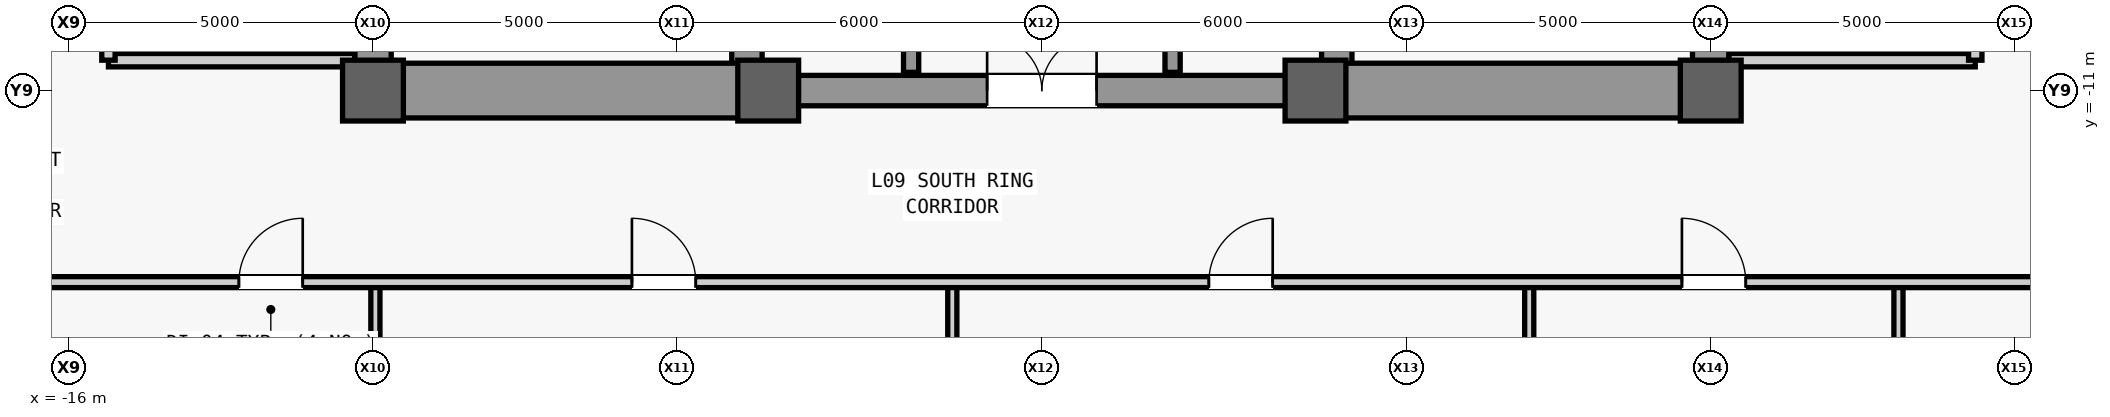
"""IFC4 building model, lengths in metres.
Left out: names, types, materials, properties, quantities, classifications, styles, units other than length and angle.
Written with IfcOpenShell. Run it as: python <this file> out.ifc"""

import sys

from ifc_helpers import new_model, si_unit, direction, frame, frame_2d, origin, origin_2d, place, context, subcontext, project, spatial, rectangle, extrude, source, transform, mapped, element, fill, save


model = new_model("IFC4")
c1 = context("Model", 3, precision=1e-05, world=origin(), true_north=direction((0.0, 1.0)))
c2 = subcontext(c1, "Body", "Model", "MODEL_VIEW")
j1 = project(units=[si_unit("LENGTHUNIT", "METRE"), si_unit("PLANEANGLEUNIT", "RADIAN")], contexts=[c1])
p1 = place(None, origin())
s1 = spatial("IfcSite", under=j1, at=p1, CompositionType="ELEMENT")
p2 = place(p1, origin())
s2 = spatial("IfcBuilding", under=s1, at=p2, CompositionType="ELEMENT")
p3 = place(p2, frame((0.0, 0.0, 45.2)))
s3 = spatial("IfcBuildingStorey", under=s2, at=p3, CompositionType="ELEMENT", Elevation=45.2)
m1 = source(origin(), c2, "Body", "SweptSolid", [
    extrude(rectangle(XDim=22.0, YDim=0.6, at=frame_2d((11.0, 0.0))), origin(), (0.0, 0.0, 1.0), 3.94),
])
p4 = place(p3, frame((-11.0, -11.0, 0.0), z_axis=(0.0, 0.0, 1.0), x_axis=(0.0, 1.0, 0.0)))
e1 = element("IfcWall", 1, at=p4, inside=s3, PredefinedType="SHEAR", context=c2, shape_type="MappedRepresentation", body=[
    mapped(m1, transform((0.0, 0.0, 0.0), scale=1.0)),
])
m2 = source(origin(), c2, "Body", "SweptSolid", [
    extrude(rectangle(XDim=1.1, YDim=2.2, at=frame_2d((0.55, 1.1))), frame((0.0, 0.31, 0.0), z_axis=(0.0, -1.0, 0.0), x_axis=(1.0, 0.0, 0.0)), (0.0, 0.0, 1.0), 0.62),
])
p5 = place(p4, frame((0.8, 0.0, 0.0)))
e2 = element("IfcOpeningElement", 2, at=p5, cuts=e1, PredefinedType="OPENING", context=c2, shape_type="MappedRepresentation", body=[
    mapped(m2, transform((0.0, 0.0, 0.0), scale=1.0)),
])
p6 = place(p4, frame((12.5, 0.0, 0.0)))
e3 = element("IfcOpeningElement", 3, at=p6, cuts=e1, PredefinedType="OPENING", context=c2, shape_type="MappedRepresentation", body=[
    mapped(m2, transform((0.0, 0.0, 0.0), scale=1.0)),
])
m3 = source(origin(), c2, "Body", "SweptSolid", [
    extrude(rectangle(XDim=0.9, YDim=2.15, at=frame_2d((0.45, 1.075))), frame((0.0, 0.31, 0.0), z_axis=(0.0, -1.0, 0.0), x_axis=(1.0, 0.0, 0.0)), (0.0, 0.0, 1.0), 0.62),
])
p7 = place(p4, frame((6.2, 0.0, 0.0)))
e4 = element("IfcOpeningElement", 4, at=p7, cuts=e1, PredefinedType="OPENING", context=c2, shape_type="MappedRepresentation", body=[
    mapped(m3, transform((0.0, 0.0, 0.0), scale=1.0)),
])
p8 = place(p4, frame((8.05, 0.0, 0.0)))
e5 = element("IfcOpeningElement", 5, at=p8, cuts=e1, PredefinedType="OPENING", context=c2, shape_type="MappedRepresentation", body=[
    mapped(m3, transform((0.0, 0.0, 0.0), scale=1.0)),
])
m4 = source(origin(), c2, "Body", "SweptSolid", [
    extrude(rectangle(XDim=1.3, YDim=2.3, at=frame_2d((0.65, 1.15))), frame((0.0, 0.31, 0.0), z_axis=(0.0, -1.0, 0.0), x_axis=(1.0, 0.0, 0.0)), (0.0, 0.0, 1.0), 0.62),
])
p9 = place(p4, frame((2.7, 0.0, 0.0)))
e6 = element("IfcOpeningElement", 6, at=p9, cuts=e1, PredefinedType="OPENING", context=c2, shape_type="MappedRepresentation", body=[
    mapped(m4, transform((0.0, 0.0, 0.0), scale=1.0)),
])
p10 = place(p3, frame((11.0, -11.0, 0.0), z_axis=(0.0, 0.0, 1.0), x_axis=(0.0, 1.0, 0.0)))
e7 = element("IfcWall", 7, at=p10, inside=s3, PredefinedType="SHEAR", context=c2, shape_type="MappedRepresentation", body=[
    mapped(m1, transform((0.0, 0.0, 0.0), scale=1.0)),
])
p11 = place(p10, frame((0.8, 0.0, 0.0)))
e8 = element("IfcOpeningElement", 8, at=p11, cuts=e7, PredefinedType="OPENING", context=c2, shape_type="MappedRepresentation", body=[
    mapped(m2, transform((0.0, 0.0, 0.0), scale=1.0)),
])
p12 = place(p10, frame((6.85, 0.0, 0.0)))
e9 = element("IfcOpeningElement", 9, at=p12, cuts=e7, PredefinedType="OPENING", context=c2, shape_type="MappedRepresentation", body=[
    mapped(m3, transform((0.0, 0.0, 0.0), scale=1.0)),
])
p13 = place(p10, frame((2.7, 0.0, 0.0)))
e10 = element("IfcOpeningElement", 10, at=p13, cuts=e7, PredefinedType="OPENING", context=c2, shape_type="MappedRepresentation", body=[
    mapped(m4, transform((0.0, 0.0, 0.0), scale=1.0)),
])
p14 = place(p10, frame((13.35, 0.0, 0.0)))
e11 = element("IfcOpeningElement", 11, at=p14, cuts=e7, PredefinedType="OPENING", context=c2, shape_type="MappedRepresentation", body=[
    mapped(m4, transform((0.0, 0.0, 0.0), scale=1.0)),
])
m5 = source(origin(), c2, "Body", "SweptSolid", [
    extrude(rectangle(XDim=21.4, YDim=0.5, at=frame_2d((10.7, 0.0))), origin(), (0.0, 0.0, 1.0), 3.94),
])
for number, where, z_axis, x_axis in (
    (12, (-4.85, -10.7, 0.0), (0.0, 0.0, 1.0), (0.0, 1.0, 0.0)),
    (13, (4.85, -10.7, 0.0), (0.0, 0.0, 1.0), (0.0, 1.0, 0.0)),
):
    element("IfcWall", number, at=place(p3, frame(where, z_axis=z_axis, x_axis=x_axis)), inside=s3, PredefinedType="SHEAR", context=c2, shape_type="MappedRepresentation", body=[
        mapped(m5, transform((0.0, 0.0, 0.0), scale=1.0)),
    ])
m6 = source(origin(), c2, "Body", "SweptSolid", [
    extrude(rectangle(XDim=5.85, YDim=0.9, at=frame_2d((2.925, 0.0))), origin(), (0.0, 0.0, 1.0), 3.94),
])
for number, where, z_axis, x_axis in (
    (14, (-10.7, -11.0, 0.0), (0.0, 0.0, 1.0), (1.0, 0.0, 0.0)),
    (15, (4.85, -11.0, 0.0), (0.0, 0.0, 1.0), (1.0, 0.0, 0.0)),
):
    element("IfcWall", number, at=place(p3, frame(where, z_axis=z_axis, x_axis=x_axis)), inside=s3, PredefinedType="SHEAR", context=c2, shape_type="MappedRepresentation", body=[
        mapped(m6, transform((0.0, 0.0, 0.0), scale=1.0)),
    ])
m7 = source(origin(), c2, "Body", "SweptSolid", [
    extrude(rectangle(XDim=9.2, YDim=0.5, at=frame_2d((4.6, 0.0))), origin(), (0.0, 0.0, 1.0), 3.94),
])
p15 = place(p3, frame((-4.6, -11.0, 0.0), z_axis=(0.0, 0.0, 1.0), x_axis=(1.0, 0.0, 0.0)))
e16 = element("IfcWall", 16, at=p15, inside=s3, PredefinedType="SHEAR", context=c2, shape_type="MappedRepresentation", body=[
    mapped(m7, transform((0.0, 0.0, 0.0), scale=1.0)),
])
m8 = source(origin(), c2, "Body", "SweptSolid", [
    extrude(rectangle(XDim=1.8, YDim=2.25, at=frame_2d((0.9, 1.125))), frame((0.0, 0.26, 0.0), z_axis=(0.0, -1.0, 0.0), x_axis=(1.0, 0.0, 0.0)), (0.0, 0.0, 1.0), 0.52),
])
p16 = place(p15, frame((3.7, 0.0, 0.0)))
e17 = element("IfcOpeningElement", 17, at=p16, cuts=e16, PredefinedType="OPENING", context=c2, shape_type="MappedRepresentation", body=[
    mapped(m8, transform((0.0, 0.0, 0.0), scale=1.0)),
])
m9 = source(origin(), c2, "Body", "SweptSolid", [
    extrude(rectangle(XDim=1.0, YDim=1.0, at=origin_2d()), origin(), (0.0, 0.0, 1.0), 4.2),
])
for number, where, z_axis, x_axis in (
    (18, (-11.0, -11.0, 0.0), (0.0, 0.0, 1.0), (1.0, 0.0, 0.0)),
    (19, (-4.5, -11.0, 0.0), (0.0, 0.0, 1.0), (1.0, 0.0, 0.0)),
    (20, (4.5, -11.0, 0.0), (0.0, 0.0, 1.0), (1.0, 0.0, 0.0)),
    (21, (11.0, -11.0, 0.0), (0.0, 0.0, 1.0), (1.0, 0.0, 0.0)),
):
    element("IfcColumn", number, at=place(p3, frame(where, z_axis=z_axis, x_axis=x_axis)), inside=s3, PredefinedType="COLUMN", context=c2, shape_type="MappedRepresentation", body=[
        mapped(m9, transform((0.0, 0.0, 0.0), scale=1.0)),
    ])
m10 = source(origin(), c2, "Body", "SweptSolid", [
    extrude(rectangle(XDim=4.05, YDim=0.22, at=frame_2d((2.025, 0.0))), origin(), (0.0, 0.0, 1.0), 3.94),
])
p17 = place(p3, frame((-15.35, -10.5, 0.0), z_axis=(0.0, 0.0, 1.0), x_axis=(1.0, 0.0, 0.0)))
e22 = element("IfcWall", 22, at=p17, inside=s3, PredefinedType="PARTITIONING", context=c2, shape_type="MappedRepresentation", body=[
    mapped(m10, transform((0.0, 0.0, 0.0), scale=1.0)),
])
m11 = source(origin(), c2, "Body", "SweptSolid", [
    extrude(rectangle(XDim=4.4, YDim=0.22, at=frame_2d((2.2, 0.0))), origin(), (0.0, 0.0, 1.0), 3.94),
])
p18 = place(p3, frame((-15.35, -10.5, 0.0), z_axis=(0.0, 0.0, 1.0), x_axis=(0.0, 1.0, 0.0)))
e23 = element("IfcWall", 23, at=p18, inside=s3, PredefinedType="PARTITIONING", context=c2, shape_type="MappedRepresentation", body=[
    mapped(m11, transform((0.0, 0.0, 0.0), scale=1.0)),
])
m12 = source(origin(), c2, "Body", "SweptSolid", [
    extrude(rectangle(XDim=1.2, YDim=2.2, at=frame_2d((0.6, 1.1))), frame((0.0, 0.12, 0.0), z_axis=(0.0, -1.0, 0.0), x_axis=(1.0, 0.0, 0.0)), (0.0, 0.0, 1.0), 0.24),
])
p19 = place(p18, frame((1.6, 0.0, 0.0)))
e24 = element("IfcOpeningElement", 24, at=p19, cuts=e23, PredefinedType="OPENING", context=c2, shape_type="MappedRepresentation", body=[
    mapped(m12, transform((0.0, 0.0, 0.0), scale=1.0)),
])
p20 = place(p3, frame((11.3, -10.5, 0.0), z_axis=(0.0, 0.0, 1.0), x_axis=(1.0, 0.0, 0.0)))
e25 = element("IfcWall", 25, at=p20, inside=s3, PredefinedType="PARTITIONING", context=c2, shape_type="MappedRepresentation", body=[
    mapped(m10, transform((0.0, 0.0, 0.0), scale=1.0)),
])
p21 = place(p3, frame((15.35, -10.5, 0.0), z_axis=(0.0, 0.0, 1.0), x_axis=(0.0, 1.0, 0.0)))
e26 = element("IfcWall", 26, at=p21, inside=s3, PredefinedType="PARTITIONING", context=c2, shape_type="MappedRepresentation", body=[
    mapped(m11, transform((0.0, 0.0, 0.0), scale=1.0)),
])
p22 = place(p21, frame((1.6, 0.0, 0.0)))
e27 = element("IfcOpeningElement", 27, at=p22, cuts=e26, PredefinedType="OPENING", context=c2, shape_type="MappedRepresentation", body=[
    mapped(m12, transform((0.0, 0.0, 0.0), scale=1.0)),
])
m13 = source(origin(), c2, "Body", "SweptSolid", [
    extrude(rectangle(XDim=5.4, YDim=0.25, at=frame_2d((2.7, 0.0))), origin(), (0.0, 0.0, 1.0), 3.94),
])
p23 = place(p3, frame((-2.15, -10.7, 0.0), z_axis=(0.0, 0.0, 1.0), x_axis=(0.0, 1.0, 0.0)))
e28 = element("IfcWall", 28, at=p23, inside=s3, PredefinedType="SHEAR", context=c2, shape_type="MappedRepresentation", body=[
    mapped(m13, transform((0.0, 0.0, 0.0), scale=1.0)),
])
m14 = source(origin(), c2, "Body", "SweptSolid", [
    extrude(rectangle(XDim=1.2, YDim=2.3, at=frame_2d((0.6, 1.15))), frame((0.0, 0.135, 0.0), z_axis=(0.0, -1.0, 0.0), x_axis=(1.0, 0.0, 0.0)), (0.0, 0.0, 1.0), 0.27),
])
p24 = place(p23, frame((0.9, 0.0, 0.0)))
e29 = element("IfcOpeningElement", 29, at=p24, cuts=e28, PredefinedType="OPENING", context=c2, shape_type="MappedRepresentation", body=[
    mapped(m14, transform((0.0, 0.0, 0.0), scale=1.0)),
])
p25 = place(p23, frame((3.2, 0.0, 0.0)))
e30 = element("IfcOpeningElement", 30, at=p25, cuts=e28, PredefinedType="OPENING", context=c2, shape_type="MappedRepresentation", body=[
    mapped(m14, transform((0.0, 0.0, 0.0), scale=1.0)),
])
p26 = place(p3, frame((2.15, -10.7, 0.0), z_axis=(0.0, 0.0, 1.0), x_axis=(0.0, 1.0, 0.0)))
e31 = element("IfcWall", 31, at=p26, inside=s3, PredefinedType="SHEAR", context=c2, shape_type="MappedRepresentation", body=[
    mapped(m13, transform((0.0, 0.0, 0.0), scale=1.0)),
])
p27 = place(p26, frame((0.9, 0.0, 0.0)))
e32 = element("IfcOpeningElement", 32, at=p27, cuts=e31, PredefinedType="OPENING", context=c2, shape_type="MappedRepresentation", body=[
    mapped(m14, transform((0.0, 0.0, 0.0), scale=1.0)),
])
p28 = place(p26, frame((3.2, 0.0, 0.0)))
e33 = element("IfcOpeningElement", 33, at=p28, cuts=e31, PredefinedType="OPENING", context=c2, shape_type="MappedRepresentation", body=[
    mapped(m14, transform((0.0, 0.0, 0.0), scale=1.0)),
])
m15 = source(origin(), c2, "Body", "SweptSolid", [
    extrude(rectangle(XDim=17.85, YDim=0.15, at=frame_2d((8.925, 0.0))), origin(), (0.0, 0.0, 1.0), 3.085),
])
p29 = place(p3, frame((-10.96, -32.0, 0.0), z_axis=(0.0, 0.0, 1.0), x_axis=(0.0, 1.0, 0.0)))
e34 = element("IfcWall", 34, at=p29, inside=s3, PredefinedType="PARTITIONING", context=c2, shape_type="MappedRepresentation", body=[
    mapped(m15, transform((0.0, 0.0, 0.0), scale=1.0)),
])
m16 = source(origin(), c2, "Body", "SweptSolid", [
    extrude(rectangle(XDim=17.85, YDim=0.15, at=frame_2d((8.925, 0.0))), origin(), (0.0, 0.0, 1.0), 3.94),
])
for number, where, z_axis, x_axis in (
    (35, (-1.472, -32.0, 0.0), (0.0, 0.0, 1.0), (0.0, 1.0, 0.0)),
    (36, (8.015, -32.0, 0.0), (0.0, 0.0, 1.0), (0.0, 1.0, 0.0)),
):
    element("IfcWall", number, at=place(p3, frame(where, z_axis=z_axis, x_axis=x_axis)), inside=s3, PredefinedType="PARTITIONING", context=c2, shape_type="MappedRepresentation", body=[
        mapped(m16, transform((0.0, 0.0, 0.0), scale=1.0)),
    ])
p30 = place(p3, frame((14.087, -32.0, 0.0), z_axis=(0.0, 0.0, 1.0), x_axis=(0.0, 1.0, 0.0)))
e37 = element("IfcWall", 37, at=p30, inside=s3, PredefinedType="PARTITIONING", context=c2, shape_type="MappedRepresentation", body=[
    mapped(m16, transform((0.0, 0.0, 0.0), scale=1.0)),
])
m17 = source(origin(), c2, "Body", "SweptSolid", [
    extrude(rectangle(XDim=0.95, YDim=2.15, at=frame_2d((0.475, 1.075))), frame((0.0, 0.085, 0.0), z_axis=(0.0, -1.0, 0.0), x_axis=(1.0, 0.0, 0.0)), (0.0, 0.0, 1.0), 0.17),
])
p31 = place(p30, frame((8.45, 0.0, 0.0)))
e38 = element("IfcOpeningElement", 38, at=p31, cuts=e37, PredefinedType="OPENING", context=c2, shape_type="MappedRepresentation", body=[
    mapped(m17, transform((0.0, 0.0, 0.0), scale=1.0)),
])
m18 = source(origin(), c2, "Body", "SweptSolid", [
    extrude(rectangle(XDim=37.95, YDim=0.18, at=frame_2d((18.975, 0.0))), origin(), (0.0, 0.0, 1.0), 3.94),
])
p32 = place(p3, frame((-18.55, -14.15, 0.0), z_axis=(0.0, 0.0, 1.0), x_axis=(1.0, 0.0, 0.0)))
e39 = element("IfcWall", 39, at=p32, inside=s3, PredefinedType="PARTITIONING", context=c2, shape_type="MappedRepresentation", body=[
    mapped(m18, transform((0.0, 0.0, 0.0), scale=1.0)),
])
m19 = source(origin(), c2, "Body", "SweptSolid", [
    extrude(rectangle(XDim=1.05, YDim=2.2, at=frame_2d((0.525, 1.1))), frame((0.0, 0.1, 0.0), z_axis=(0.0, -1.0, 0.0), x_axis=(1.0, 0.0, 0.0)), (0.0, 0.0, 1.0), 0.2),
])
p33 = place(p32, frame((5.345, 0.0, 0.0)))
e40 = element("IfcOpeningElement", 40, at=p33, cuts=e39, PredefinedType="OPENING", context=c2, shape_type="MappedRepresentation", body=[
    mapped(m19, transform((0.0, 0.0, 0.0), scale=1.0)),
])
p34 = place(p32, frame((11.809, 0.0, 0.0)))
e41 = element("IfcOpeningElement", 41, at=p34, cuts=e39, PredefinedType="OPENING", context=c2, shape_type="MappedRepresentation", body=[
    mapped(m19, transform((0.0, 0.0, 0.0), scale=1.0)),
])
p35 = place(p32, frame((21.296, 0.0, 0.0)))
e42 = element("IfcOpeningElement", 42, at=p35, cuts=e39, PredefinedType="OPENING", context=c2, shape_type="MappedRepresentation", body=[
    mapped(m19, transform((0.0, 0.0, 0.0), scale=1.0)),
])
p36 = place(p32, frame((29.076, 0.0, 0.0)))
e43 = element("IfcOpeningElement", 43, at=p36, cuts=e39, PredefinedType="OPENING", context=c2, shape_type="MappedRepresentation", body=[
    mapped(m19, transform((0.0, 0.0, 0.0), scale=1.0)),
])
m20 = source(origin(), c2, "Body", "SweptSolid", [
    extrude(rectangle(XDim=1.8, YDim=2.25, at=frame_2d((0.9, 1.125))), frame((0.0, 0.025, 0.0), z_axis=(0.0, -1.0, 0.0), x_axis=(1.0, 0.0, 0.0)), (0.0, 0.0, 1.0), 0.05),
])
p37 = place(p16, origin())
e44 = element("IfcDoor", 44, at=p37, inside=s3, OperationType="SINGLE_SWING_LEFT", PredefinedType="DOOR", context=c2, shape_type="MappedRepresentation", body=[
    mapped(m20, transform((0.0, 0.0, 0.0), scale=1.0)),
])
fill(e17, e44)
m21 = source(origin(), c2, "Body", "SweptSolid", [
    extrude(rectangle(XDim=1.05, YDim=2.2, at=frame_2d((0.525, 1.1))), frame((0.0, 0.025, 0.0), z_axis=(0.0, -1.0, 0.0), x_axis=(1.0, 0.0, 0.0)), (0.0, 0.0, 1.0), 0.05),
])
p38 = place(p33, origin())
e45 = element("IfcDoor", 45, at=p38, inside=s3, OperationType="SINGLE_SWING_RIGHT", PredefinedType="DOOR", context=c2, shape_type="MappedRepresentation", body=[
    mapped(m21, transform((0.0, 0.0, 0.0), scale=1.0)),
])
fill(e40, e45)
p39 = place(p34, origin())
e46 = element("IfcDoor", 46, at=p39, inside=s3, OperationType="SINGLE_SWING_LEFT", PredefinedType="DOOR", context=c2, shape_type="MappedRepresentation", body=[
    mapped(m21, transform((0.0, 0.0, 0.0), scale=1.0)),
])
fill(e41, e46)
p40 = place(p35, origin())
e47 = element("IfcDoor", 47, at=p40, inside=s3, OperationType="SINGLE_SWING_RIGHT", PredefinedType="DOOR", context=c2, shape_type="MappedRepresentation", body=[
    mapped(m21, transform((0.0, 0.0, 0.0), scale=1.0)),
])
fill(e42, e47)
p41 = place(p36, origin())
e48 = element("IfcDoor", 48, at=p41, inside=s3, OperationType="SINGLE_SWING_LEFT", PredefinedType="DOOR", context=c2, shape_type="MappedRepresentation", body=[
    mapped(m21, transform((0.0, 0.0, 0.0), scale=1.0)),
])
fill(e43, e48)
save(model, sys.argv[1])
